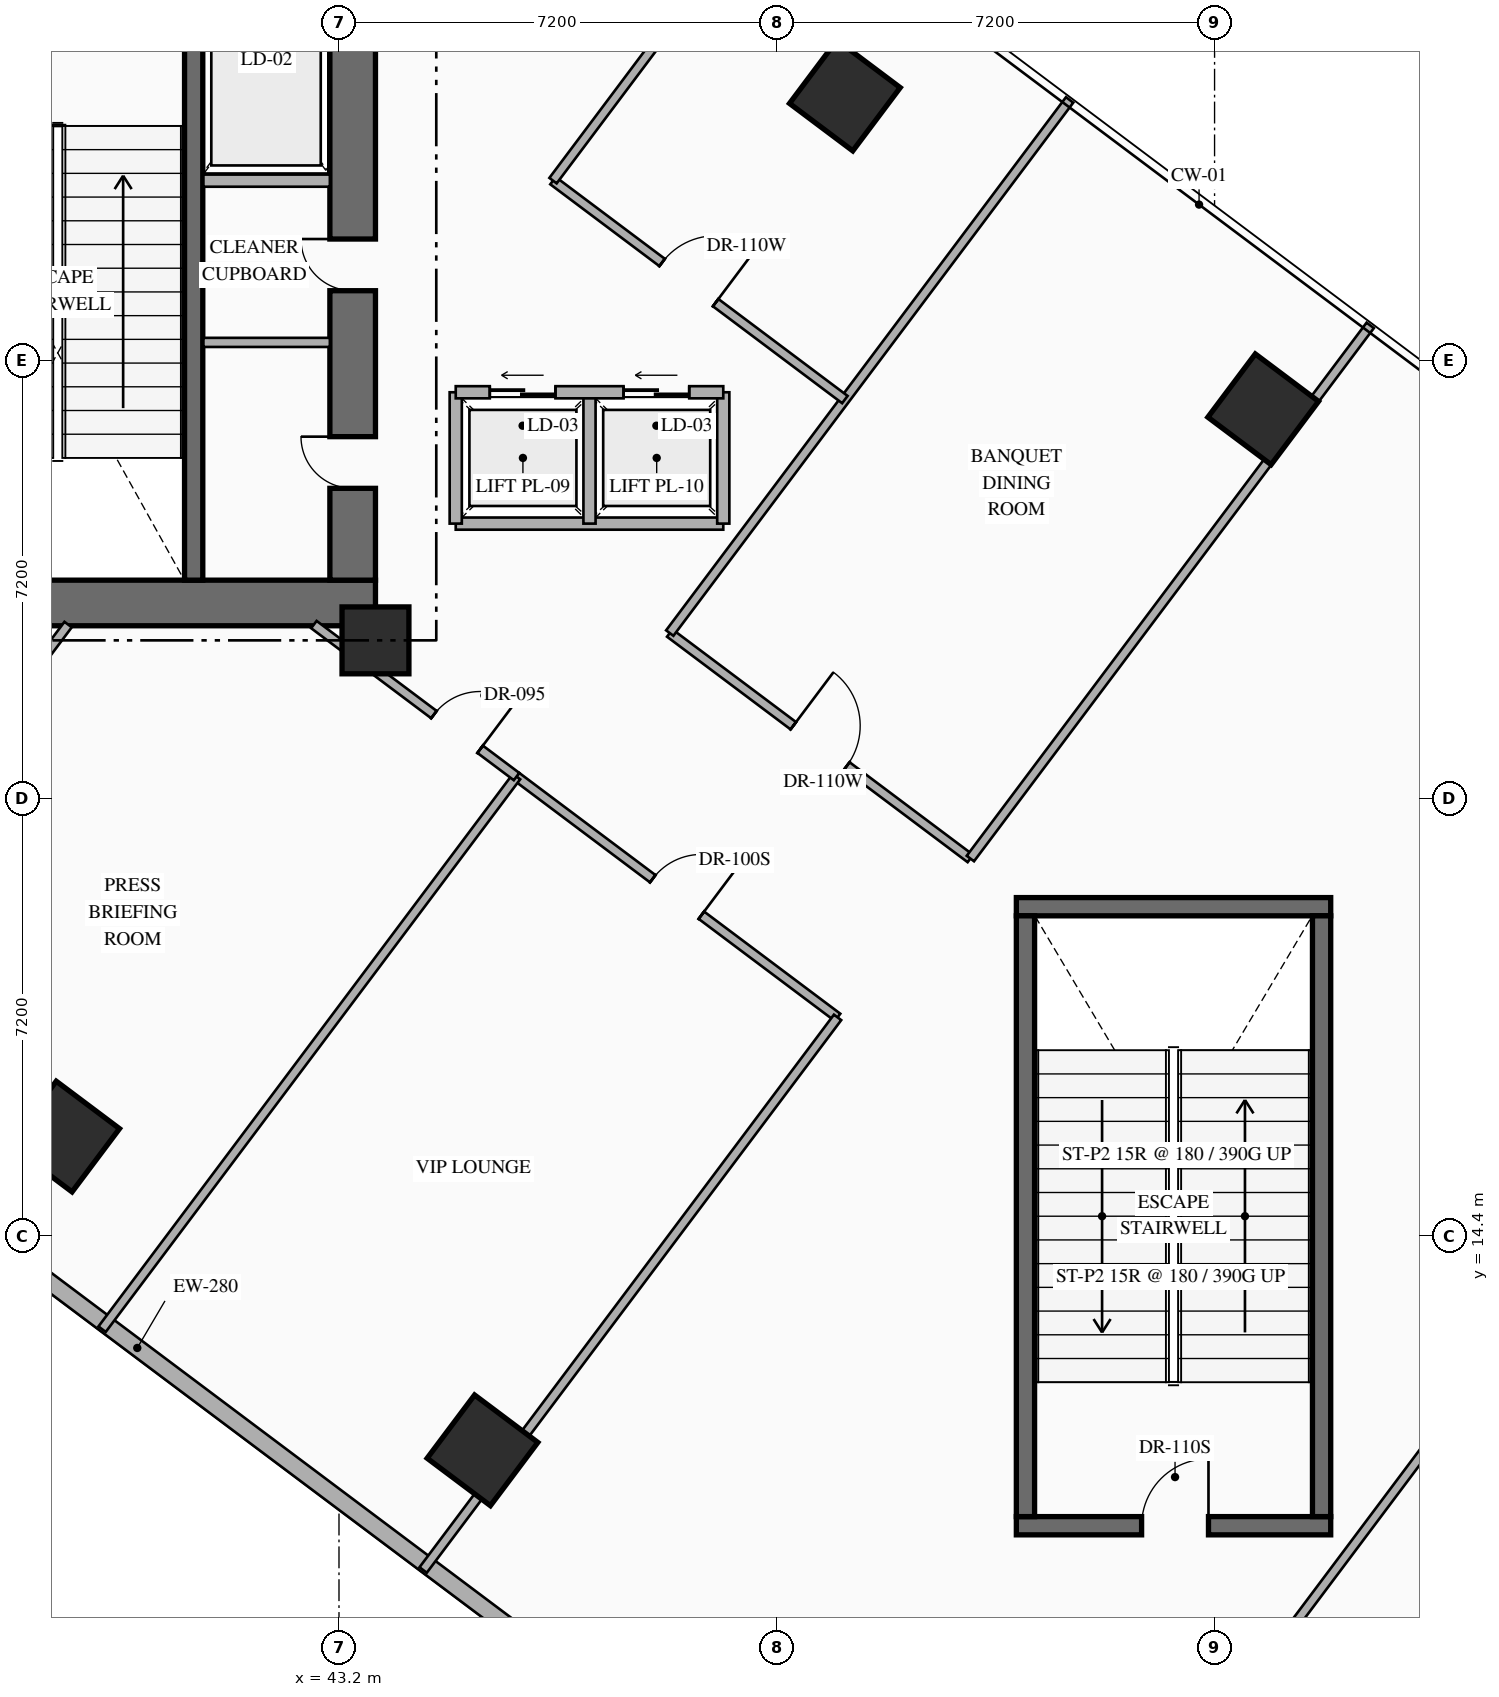
"""IFC4 building model, lengths in metres.
Left out: names, types, materials, properties, quantities, classifications, styles, units other than length and angle.
Written with IfcOpenShell. Run it as: python <this file> out.ifc"""

import sys

from ifc_helpers import new_model, si_unit, direction, frame, frame_2d, origin, origin_2d, place, context, subcontext, project, spatial, rectangle, extrude, element, fill, save


model = new_model("IFC4")
c1 = context("Model", 3, precision=1e-05, world=origin(), true_north=direction((0.0, 1.0)))
c2 = subcontext(c1, "Body", "Model", "MODEL_VIEW")
j1 = project(units=[si_unit("LENGTHUNIT", "METRE"), si_unit("PLANEANGLEUNIT", "RADIAN")], contexts=[c1])
p1 = place(None, origin())
s1 = spatial("IfcSite", under=j1, at=p1, CompositionType="ELEMENT")
p2 = place(p1, origin())
s2 = spatial("IfcBuilding", under=s1, at=p2, CompositionType="ELEMENT")
p3 = place(p2, frame((0.0, 0.0, 16.2)))
s3 = spatial("IfcBuildingStorey", under=s2, at=p3, CompositionType="ELEMENT", Elevation=16.2)
p4 = place(p3, frame((35.74, 24.815, 0.0), z_axis=(0.0, 0.0, 1.0), x_axis=(1.0, 0.0, 0.0)))
e1 = element("IfcWall", 1, at=p4, inside=s3, PredefinedType="SHEAR", context=c2, shape_type="SweptSolid", body=[
    extrude(rectangle(XDim=8.06, YDim=0.75, at=frame_2d((4.03, 0.0))), origin(), (0.0, 0.0, 1.0), 5.4),
])
p5 = place(p3, frame((43.425, 25.19, 0.0), z_axis=(0.0, 0.0, 1.0), x_axis=(0.0, 1.0, 0.0)))
e2 = element("IfcWall", 2, at=p5, inside=s3, PredefinedType="SHEAR", context=c2, shape_type="SweptSolid", body=[
    extrude(rectangle(XDim=9.48, YDim=0.75, at=frame_2d((4.74, 0.0))), origin(), (0.0, 0.0, 1.0), 5.4),
])
p6 = place(p5, frame((1.51, 0.0, 0.0)))
e3 = element("IfcOpeningElement", 3, at=p6, cuts=e2, PredefinedType="OPENING", context=c2, shape_type="SweptSolid", body=[
    extrude(rectangle(XDim=0.85, YDim=2.08, at=frame_2d((0.425, 1.04))), frame((0.0, 0.385, 0.0), z_axis=(0.0, -1.0, 0.0), x_axis=(1.0, 0.0, 0.0)), (0.0, 0.0, 1.0), 0.77),
])
p7 = place(p5, frame((4.76, 0.0, 0.0)))
e4 = element("IfcOpeningElement", 4, at=p7, cuts=e2, PredefinedType="OPENING", context=c2, shape_type="SweptSolid", body=[
    extrude(rectangle(XDim=0.85, YDim=2.08, at=frame_2d((0.425, 1.04))), frame((0.0, 0.385, 0.0), z_axis=(0.0, -1.0, 0.0), x_axis=(1.0, 0.0, 0.0)), (0.0, 0.0, 1.0), 0.77),
])
p8 = place(p3, frame((40.81, 25.19, 0.0), z_axis=(0.0, 0.0, 1.0), x_axis=(0.0, 1.0, 0.0)))
e5 = element("IfcWall", 5, at=p8, inside=s3, PredefinedType="SHEAR", context=c2, shape_type="SweptSolid", body=[
    extrude(rectangle(XDim=9.48, YDim=0.3, at=frame_2d((4.74, 0.0))), origin(), (0.0, 0.0, 1.0), 5.4),
])
p9 = place(p3, frame((54.34, 9.64, 0.0), z_axis=(0.0, 0.0, 1.0), x_axis=(1.0, 0.0, 0.0)))
e6 = element("IfcWall", 6, at=p9, inside=s3, PredefinedType="SHEAR", context=c2, shape_type="SweptSolid", body=[
    extrude(rectangle(XDim=5.17, YDim=0.3, at=frame_2d((2.585, 0.0))), origin(), (0.0, 0.0, 1.0), 5.4),
])
p10 = place(p9, frame((2.06, 0.0, 0.0)))
e7 = element("IfcOpeningElement", 7, at=p10, cuts=e6, PredefinedType="OPENING", context=c2, shape_type="SweptSolid", body=[
    extrude(rectangle(XDim=1.1, YDim=2.2, at=frame_2d((0.55, 1.1))), frame((0.0, 0.16, 0.0), z_axis=(0.0, -1.0, 0.0), x_axis=(1.0, 0.0, 0.0)), (0.0, 0.0, 1.0), 0.32),
])
p11 = place(p3, frame((54.34, 19.82, 0.0), z_axis=(0.0, 0.0, 1.0), x_axis=(1.0, 0.0, 0.0)))
e8 = element("IfcWall", 8, at=p11, inside=s3, PredefinedType="SHEAR", context=c2, shape_type="SweptSolid", body=[
    extrude(rectangle(XDim=5.17, YDim=0.3, at=frame_2d((2.585, 0.0))), origin(), (0.0, 0.0, 1.0), 5.4),
])
for number, where, z_axis, x_axis in (
    (9, (54.49, 9.79, 0.0), (0.0, 0.0, 1.0), (0.0, 1.0, 0.0)),
    (10, (59.36, 9.79, 0.0), (0.0, 0.0, 1.0), (0.0, 1.0, 0.0)),
):
    element("IfcWall", number, at=place(p3, frame(where, z_axis=z_axis, x_axis=x_axis)), inside=s3, PredefinedType="SHEAR", context=c2, shape_type="SweptSolid", body=[
        extrude(rectangle(XDim=9.88, YDim=0.3, at=frame_2d((4.94, 0.0))), origin(), (0.0, 0.0, 1.0), 5.4),
    ])
p12 = place(p3, frame((43.8, 24.2, 0.0), z_axis=(0.0, 0.0, 1.0), x_axis=(1.0, 0.0, 0.0)))
e11 = element("IfcColumn", 11, at=p12, inside=s3, PredefinedType="COLUMN", context=c2, shape_type="SweptSolid", body=[
    extrude(rectangle(XDim=1.1, YDim=1.1, at=origin_2d()), origin(), (0.0, 0.0, 1.0), 5.4),
])
for number, where, z_axis, x_axis in (
    (12, (38.68, 16.04, 0.0), (0.0, 0.0, 1.0), (0.8, -0.6, 0.0)),
    (13, (51.52, 33.16, 0.0), (0.0, 0.0, 1.0), (0.8, -0.6, 0.0)),
    (14, (45.56, 10.88, 0.0), (0.0, 0.0, 1.0), (0.8, -0.6, 0.0)),
    (15, (58.4, 28.0, 0.0), (0.0, 0.0, 1.0), (0.8, -0.6, 0.0)),
):
    element("IfcColumn", number, at=place(p3, frame(where, z_axis=z_axis, x_axis=x_axis)), inside=s3, PredefinedType="COLUMN", context=c2, shape_type="SweptSolid", body=[
        extrude(rectangle(XDim=1.3, YDim=1.3, at=origin_2d()), origin(), (0.0, 0.0, 1.0), 5.4),
    ])
p13 = place(p3, frame((54.518, 1.587, 0.0), z_axis=(0.0, 0.0, 1.0), x_axis=(-0.800001601415, 0.599997864774, 0.0)))
e16 = element("IfcWall", 16, at=p13, inside=s3, PredefinedType="STANDARD", context=c2, shape_type="SweptSolid", body=[
    extrude(rectangle(XDim=36.589, YDim=0.28, at=frame_2d((18.294, 0.0))), origin(), (0.0, 0.0, 1.0), 5.1),
])
p14 = place(p3, frame((40.97, 31.76, 0.0), z_axis=(0.0, 0.0, 1.0), x_axis=(1.0, 0.0, 0.0)))
e17 = element("IfcWall", 17, at=p14, inside=s3, PredefinedType="STANDARD", context=c2, shape_type="SweptSolid", body=[
    extrude(rectangle(XDim=2.08, YDim=0.2, at=frame_2d((1.04, 0.0))), origin(), (0.0, 0.0, 1.0), 5.1),
])
p15 = place(p3, frame((40.97, 29.1, 0.0), z_axis=(0.0, 0.0, 1.0), x_axis=(1.0, 0.0, 0.0)))
e18 = element("IfcWall", 18, at=p15, inside=s3, PredefinedType="PARTITIONING", context=c2, shape_type="SweptSolid", body=[
    extrude(rectangle(XDim=2.08, YDim=0.15, at=frame_2d((1.04, 0.0))), origin(), (0.0, 0.0, 1.0), 5.1),
])
p16 = place(p3, frame((45.12, 26.12, 0.0), z_axis=(0.0, 0.0, 1.0), x_axis=(1.0, 0.0, 0.0)))
e19 = element("IfcWall", 19, at=p16, inside=s3, PredefinedType="STANDARD", context=c2, shape_type="SweptSolid", body=[
    extrude(rectangle(XDim=4.4, YDim=0.2, at=frame_2d((2.2, 0.0))), origin(), (0.0, 0.0, 1.0), 5.1),
])
for number, where, z_axis, x_axis in (
    (20, (45.12, 26.12, 0.0), (0.0, 0.0, 1.0), (0.0, 1.0, 0.0)),
    (21, (49.52, 26.12, 0.0), (0.0, 0.0, 1.0), (0.0, 1.0, 0.0)),
    (22, (47.32, 26.12, 0.0), (0.0, 0.0, 1.0), (0.0, 1.0, 0.0)),
):
    element("IfcWall", number, at=place(p3, frame(where, z_axis=z_axis, x_axis=x_axis)), inside=s3, PredefinedType="STANDARD", context=c2, shape_type="SweptSolid", body=[
        extrude(rectangle(XDim=2.16, YDim=0.2, at=frame_2d((1.08, 0.0))), origin(), (0.0, 0.0, 1.0), 5.1),
    ])
p17 = place(p3, frame((45.12, 28.28, 0.0), z_axis=(0.0, 0.0, 1.0), x_axis=(1.0, 0.0, 0.0)))
e23 = element("IfcWall", 23, at=p17, inside=s3, PredefinedType="STANDARD", context=c2, shape_type="SweptSolid", body=[
    extrude(rectangle(XDim=4.4, YDim=0.2, at=frame_2d((2.2, 0.0))), origin(), (0.0, 0.0, 1.0), 5.1),
])
p18 = place(p17, frame((0.56, 0.0, 0.0)))
e24 = element("IfcOpeningElement", 24, at=p18, cuts=e23, PredefinedType="OPENING", context=c2, shape_type="SweptSolid", body=[
    extrude(rectangle(XDim=1.08, YDim=2.15, at=frame_2d((0.54, 1.075))), frame((0.0, 0.11, 0.0), z_axis=(0.0, -1.0, 0.0), x_axis=(1.0, 0.0, 0.0)), (0.0, 0.0, 1.0), 0.22),
])
p19 = place(p17, frame((2.76, 0.0, 0.0)))
e25 = element("IfcOpeningElement", 25, at=p19, cuts=e23, PredefinedType="OPENING", context=c2, shape_type="SweptSolid", body=[
    extrude(rectangle(XDim=1.08, YDim=2.15, at=frame_2d((0.54, 1.075))), frame((0.0, 0.11, 0.0), z_axis=(0.0, -1.0, 0.0), x_axis=(1.0, 0.0, 0.0)), (0.0, 0.0, 1.0), 0.22),
])
p20 = place(p3, frame((48.64, 24.32, 0.0), z_axis=(0.0, 0.0, 1.0), x_axis=(0.80000474051, -0.599993679268, 0.0)))
e26 = element("IfcWall", 26, at=p20, inside=s3, PredefinedType="PARTITIONING", context=c2, shape_type="SweptSolid", body=[
    extrude(rectangle(XDim=6.18, YDim=0.15, at=frame_2d((3.09, 0.0))), origin(), (0.0, 0.0, 1.0), 5.1),
])
p21 = place(p20, frame((2.54, 0.0, 0.0)))
e27 = element("IfcOpeningElement", 27, at=p21, cuts=e26, PredefinedType="OPENING", context=c2, shape_type="SweptSolid", body=[
    extrude(rectangle(XDim=1.1, YDim=2.16, at=frame_2d((0.55, 1.08))), frame((0.0, 0.085, 0.0), z_axis=(0.0, -1.0, 0.0), x_axis=(1.0, 0.0, 0.0)), (0.0, 0.0, 1.0), 0.17),
])
p22 = place(p3, frame((48.64, 24.32, 0.0), z_axis=(0.0, 0.0, 1.0), x_axis=(0.600017820398, 0.799986634391, 0.0)))
e28 = element("IfcWall", 28, at=p22, inside=s3, PredefinedType="PARTITIONING", context=c2, shape_type="SweptSolid", body=[
    extrude(rectangle(XDim=10.96, YDim=0.15, at=frame_2d((5.48, 0.0))), origin(), (0.0, 0.0, 1.0), 5.1),
])
p23 = place(p3, frame((53.584, 20.612, 0.0), z_axis=(0.0, 0.0, 1.0), x_axis=(0.600003564151, 0.799997326874, 0.0)))
e29 = element("IfcWall", 29, at=p23, inside=s3, PredefinedType="PARTITIONING", context=c2, shape_type="SweptSolid", body=[
    extrude(rectangle(XDim=10.96, YDim=0.15, at=frame_2d((5.48, 0.0))), origin(), (0.0, 0.0, 1.0), 5.1),
])
p24 = place(p3, frame((46.12, 21.96, 0.0), z_axis=(0.0, 0.0, 1.0), x_axis=(0.799991121809, -0.600011837406, 0.0)))
e30 = element("IfcWall", 30, at=p24, inside=s3, PredefinedType="PARTITIONING", context=c2, shape_type="SweptSolid", body=[
    extrude(rectangle(XDim=6.6, YDim=0.15, at=frame_2d((3.3, 0.0))), origin(), (0.0, 0.0, 1.0), 5.1),
])
p25 = place(p24, frame((2.8, 0.0, 0.0)))
e31 = element("IfcOpeningElement", 31, at=p25, cuts=e30, PredefinedType="OPENING", context=c2, shape_type="SweptSolid", body=[
    extrude(rectangle(XDim=1.0, YDim=2.15, at=frame_2d((0.5, 1.075))), frame((0.0, 0.085, 0.0), z_axis=(0.0, -1.0, 0.0), x_axis=(1.0, 0.0, 0.0)), (0.0, 0.0, 1.0), 0.17),
])
p26 = place(p3, frame((39.304, 12.872, 0.0), z_axis=(0.0, 0.0, 1.0), x_axis=(0.600013754301, 0.79998968409, 0.0)))
e32 = element("IfcWall", 32, at=p26, inside=s3, PredefinedType="PARTITIONING", context=c2, shape_type="SweptSolid", body=[
    extrude(rectangle(XDim=11.36, YDim=0.15, at=frame_2d((5.68, 0.0))), origin(), (0.0, 0.0, 1.0), 5.1),
])
p27 = place(p3, frame((44.584, 8.912, 0.0), z_axis=(0.0, 0.0, 1.0), x_axis=(0.6, 0.8, 0.0)))
e33 = element("IfcWall", 33, at=p27, inside=s3, PredefinedType="PARTITIONING", context=c2, shape_type="SweptSolid", body=[
    extrude(rectangle(XDim=11.36, YDim=0.15, at=frame_2d((5.68, 0.0))), origin(), (0.0, 0.0, 1.0), 5.1),
])
p28 = place(p3, frame((54.184, 1.712, 0.0), z_axis=(0.0, 0.0, 1.0), x_axis=(0.59999392496, 0.800004556244, 0.0)))
e34 = element("IfcWall", 34, at=p28, inside=s3, PredefinedType="PARTITIONING", context=c2, shape_type="SweptSolid", body=[
    extrude(rectangle(XDim=25.72, YDim=0.15, at=frame_2d((12.86, 0.0))), origin(), (0.0, 0.0, 1.0), 5.1),
])
p29 = place(p28, frame((12.31, 0.0, 0.0)))
e35 = element("IfcOpeningElement", 35, at=p29, cuts=e34, PredefinedType="OPENING", context=c2, shape_type="SweptSolid", body=[
    extrude(rectangle(XDim=1.1, YDim=2.24, at=frame_2d((0.55, 1.12))), frame((0.0, 0.085, 0.0), z_axis=(0.0, -1.0, 0.0), x_axis=(1.0, 0.0, 0.0)), (0.0, 0.0, 1.0), 0.17),
])
p30 = place(p3, frame((46.72, 31.76, 0.0), z_axis=(0.0, 0.0, 1.0), x_axis=(0.79999511724, -0.600006510291, 0.0)))
e36 = element("IfcWall", 36, at=p30, inside=s3, PredefinedType="PARTITIONING", context=c2, shape_type="SweptSolid", body=[
    extrude(rectangle(XDim=6.0, YDim=0.15, at=frame_2d((3.0, 0.0))), origin(), (0.0, 0.0, 1.0), 5.1),
])
p31 = place(p30, frame((2.243, 0.0, 0.0)))
e37 = element("IfcOpeningElement", 37, at=p31, cuts=e36, PredefinedType="OPENING", context=c2, shape_type="SweptSolid", body=[
    extrude(rectangle(XDim=1.1, YDim=2.16, at=frame_2d((0.55, 1.08))), frame((0.0, 0.085, 0.0), z_axis=(0.0, -1.0, 0.0), x_axis=(1.0, 0.0, 0.0)), (0.0, 0.0, 1.0), 0.17),
])
p32 = place(p3, frame((46.72, 31.76, 0.0), z_axis=(0.0, 0.0, 1.0), x_axis=(0.600006341286, 0.799995243996, 0.0)))
e38 = element("IfcWall", 38, at=p32, inside=s3, PredefinedType="PARTITIONING", context=c2, shape_type="SweptSolid", body=[
    extrude(rectangle(XDim=6.16, YDim=0.15, at=frame_2d((3.08, 0.0))), origin(), (0.0, 0.0, 1.0), 5.1),
])
p33 = place(p3, frame((42.787, 24.46, 0.0), z_axis=(0.0, 0.0, 1.0), x_axis=(0.799971872363, -0.600037501685, 0.0)))
e39 = element("IfcWall", 39, at=p33, inside=s3, PredefinedType="PARTITIONING", context=c2, shape_type="SweptSolid", body=[
    extrude(rectangle(XDim=4.167, YDim=0.15, at=frame_2d((2.083, 0.0))), origin(), (0.0, 0.0, 1.0), 5.1),
])
p34 = place(p33, frame((2.468, 0.0, 0.0)))
e40 = element("IfcOpeningElement", 40, at=p34, cuts=e39, PredefinedType="OPENING", context=c2, shape_type="SweptSolid", body=[
    extrude(rectangle(XDim=0.95, YDim=2.15, at=frame_2d((0.475, 1.075))), frame((0.0, 0.085, 0.0), z_axis=(0.0, -1.0, 0.0), x_axis=(1.0, 0.0, 0.0)), (0.0, 0.0, 1.0), 0.17),
])
p35 = place(p3, frame((33.384, 17.312, 0.0), z_axis=(0.0, 0.0, 1.0), x_axis=(0.600008743659, 0.799993442181, 0.0)))
e41 = element("IfcWall", 41, at=p35, inside=s3, PredefinedType="PARTITIONING", context=c2, shape_type="SweptSolid", body=[
    extrude(rectangle(XDim=8.935, YDim=0.15, at=frame_2d((4.468, 0.0))), origin(), (0.0, 0.0, 1.0), 5.1),
])
p36 = place(p6, origin())
e42 = element("IfcDoor", 42, at=p36, inside=s3, OperationType="SINGLE_SWING_RIGHT", PredefinedType="DOOR", context=c2, shape_type="SweptSolid", body=[
    extrude(rectangle(XDim=0.85, YDim=2.08, at=frame_2d((0.425, 1.04))), frame((0.0, 0.025, 0.0), z_axis=(0.0, -1.0, 0.0), x_axis=(1.0, 0.0, 0.0)), (0.0, 0.0, 1.0), 0.05),
])
fill(e3, e42)
p37 = place(p7, origin())
e43 = element("IfcDoor", 43, at=p37, inside=s3, OperationType="SINGLE_SWING_RIGHT", PredefinedType="DOOR", context=c2, shape_type="SweptSolid", body=[
    extrude(rectangle(XDim=0.85, YDim=2.08, at=frame_2d((0.425, 1.04))), frame((0.0, 0.025, 0.0), z_axis=(0.0, -1.0, 0.0), x_axis=(1.0, 0.0, 0.0)), (0.0, 0.0, 1.0), 0.05),
])
fill(e4, e43)
p38 = place(p10, origin())
e44 = element("IfcDoor", 44, at=p38, inside=s3, OperationType="SINGLE_SWING_RIGHT", PredefinedType="DOOR", context=c2, shape_type="SweptSolid", body=[
    extrude(rectangle(XDim=1.1, YDim=2.2, at=frame_2d((0.55, 1.1))), frame((0.0, 0.025, 0.0), z_axis=(0.0, -1.0, 0.0), x_axis=(1.0, 0.0, 0.0)), (0.0, 0.0, 1.0), 0.05),
])
fill(e7, e44)
p39 = place(p18, origin())
e45 = element("IfcDoor", 45, at=p39, inside=s3, OperationType="SLIDING_TO_LEFT", PredefinedType="USERDEFINED", context=c2, shape_type="SweptSolid", body=[
    extrude(rectangle(XDim=1.08, YDim=2.15, at=frame_2d((0.54, 1.075))), frame((0.0, 0.025, 0.0), z_axis=(0.0, -1.0, 0.0), x_axis=(1.0, 0.0, 0.0)), (0.0, 0.0, 1.0), 0.05),
])
fill(e24, e45)
p40 = place(p19, origin())
e46 = element("IfcDoor", 46, at=p40, inside=s3, OperationType="SLIDING_TO_LEFT", PredefinedType="USERDEFINED", context=c2, shape_type="SweptSolid", body=[
    extrude(rectangle(XDim=1.08, YDim=2.15, at=frame_2d((0.54, 1.075))), frame((0.0, 0.025, 0.0), z_axis=(0.0, -1.0, 0.0), x_axis=(1.0, 0.0, 0.0)), (0.0, 0.0, 1.0), 0.05),
])
fill(e25, e46)
p41 = place(p21, origin())
e47 = element("IfcDoor", 47, at=p41, inside=s3, OperationType="SINGLE_SWING_LEFT", PredefinedType="DOOR", context=c2, shape_type="SweptSolid", body=[
    extrude(rectangle(XDim=1.1, YDim=2.16, at=frame_2d((0.55, 1.08))), frame((0.0, 0.025, 0.0), z_axis=(0.0, -1.0, 0.0), x_axis=(1.0, 0.0, 0.0)), (0.0, 0.0, 1.0), 0.05),
])
fill(e27, e47)
p42 = place(p25, origin())
e48 = element("IfcDoor", 48, at=p42, inside=s3, OperationType="SINGLE_SWING_RIGHT", PredefinedType="DOOR", context=c2, shape_type="SweptSolid", body=[
    extrude(rectangle(XDim=1.0, YDim=2.15, at=frame_2d((0.5, 1.075))), frame((0.0, 0.025, 0.0), z_axis=(0.0, -1.0, 0.0), x_axis=(1.0, 0.0, 0.0)), (0.0, 0.0, 1.0), 0.05),
])
fill(e31, e48)
p43 = place(p31, origin())
e49 = element("IfcDoor", 49, at=p43, inside=s3, OperationType="SINGLE_SWING_RIGHT", PredefinedType="DOOR", context=c2, shape_type="SweptSolid", body=[
    extrude(rectangle(XDim=1.1, YDim=2.16, at=frame_2d((0.55, 1.08))), frame((0.0, 0.025, 0.0), z_axis=(0.0, -1.0, 0.0), x_axis=(1.0, 0.0, 0.0)), (0.0, 0.0, 1.0), 0.05),
])
fill(e37, e49)
p44 = place(p34, origin())
e50 = element("IfcDoor", 50, at=p44, inside=s3, OperationType="SINGLE_SWING_RIGHT", PredefinedType="DOOR", context=c2, shape_type="SweptSolid", body=[
    extrude(rectangle(XDim=0.95, YDim=2.15, at=frame_2d((0.475, 1.075))), frame((0.0, 0.025, 0.0), z_axis=(0.0, -1.0, 0.0), x_axis=(1.0, 0.0, 0.0)), (0.0, 0.0, 1.0), 0.05),
])
fill(e40, e50)
save(model, sys.argv[1])
